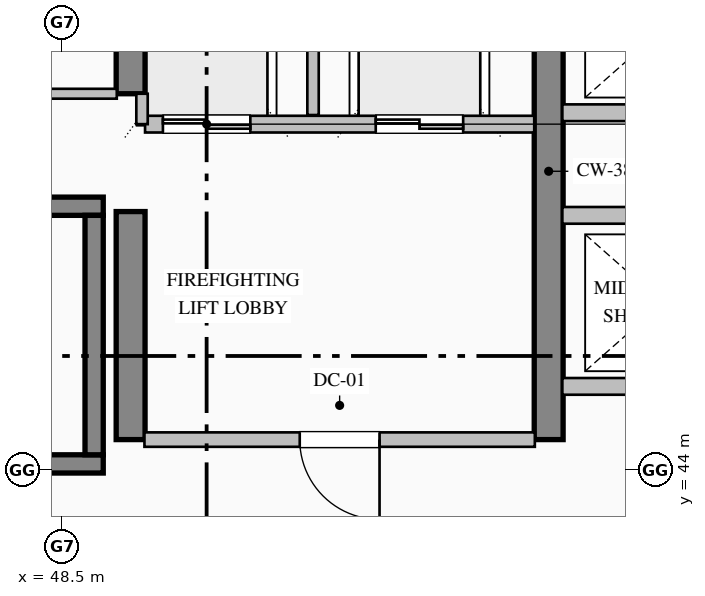
"""IFC4 building model, lengths in metres.
Left out: names, types, materials, properties, quantities, classifications, styles, units other than length and angle.
Written with IfcOpenShell. Run it as: python <this file> out.ifc"""

import sys

from ifc_helpers import new_model, si_unit, direction, frame, frame_2d, origin, place, context, subcontext, project, spatial, rectangle, extrude, element, fill, save


model = new_model("IFC4")
c1 = context("Model", 3, precision=1e-05, world=origin(), true_north=direction((0.0, 1.0)))
c2 = subcontext(c1, "Body", "Model", "MODEL_VIEW")
j1 = project(units=[si_unit("LENGTHUNIT", "METRE"), si_unit("PLANEANGLEUNIT", "RADIAN")], contexts=[c1])
p1 = place(None, origin())
s1 = spatial("IfcSite", under=j1, at=p1, CompositionType="ELEMENT")
p2 = place(p1, origin())
s2 = spatial("IfcBuilding", under=s1, at=p2, CompositionType="ELEMENT")
p3 = place(p2, frame((0.0, 0.0, 52.2)))
s3 = spatial("IfcBuildingStorey", under=s2, at=p3, CompositionType="ELEMENT", Elevation=52.2)
p4 = place(p3, frame((49.4, 44.4, 0.0), z_axis=(0.0, 0.0, 1.0), x_axis=(0.0, 1.0, 0.0)))
e1 = element("IfcWall", 1, at=p4, inside=s3, PredefinedType="SHEAR", context=c2, shape_type="SweptSolid", body=[
    extrude(rectangle(XDim=3.0, YDim=0.38, at=frame_2d((1.5, 0.0))), origin(), (0.0, 0.0, 1.0), 3.75),
])
p5 = place(p3, frame((49.4, 48.95, 0.0), z_axis=(0.0, 0.0, 1.0), x_axis=(0.0, 1.0, 0.0)))
e2 = element("IfcWall", 2, at=p5, inside=s3, PredefinedType="SHEAR", context=c2, shape_type="SweptSolid", body=[
    extrude(rectangle(XDim=2.51, YDim=0.38, at=frame_2d((1.255, 0.0))), origin(), (0.0, 0.0, 1.0), 3.75),
])
p6 = place(p3, frame((54.9, 44.4, 0.0), z_axis=(0.0, 0.0, 1.0), x_axis=(0.0, 1.0, 0.0)))
e3 = element("IfcWall", 3, at=p6, inside=s3, PredefinedType="SHEAR", context=c2, shape_type="SweptSolid", body=[
    extrude(rectangle(XDim=7.06, YDim=0.38, at=frame_2d((3.53, 0.0))), origin(), (0.0, 0.0, 1.0), 3.75),
])
for number, where, z_axis, x_axis in (
    (4, (40.96, 47.47, 0.0), (0.0, 0.0, 1.0), (1.0, 0.0, 0.0)),
    (5, (49.04, 44.08, 0.0), (0.0, 0.0, 1.0), (-1.0, 0.0, 0.0)),
):
    element("IfcWall", number, at=place(p3, frame(where, z_axis=z_axis, x_axis=x_axis)), inside=s3, PredefinedType="SOLIDWALL", context=c2, shape_type="SweptSolid", body=[
        extrude(rectangle(XDim=8.08, YDim=0.24, at=frame_2d((4.04, 0.0))), origin(), (0.0, 0.0, 1.0), 4.0),
    ])
p7 = place(p3, frame((48.92, 44.2, 0.0), z_axis=(0.0, 0.0, 1.0), x_axis=(0.0, 1.0, 0.0)))
e6 = element("IfcWall", 6, at=p7, inside=s3, PredefinedType="SOLIDWALL", context=c2, shape_type="SweptSolid", body=[
    extrude(rectangle(XDim=3.15, YDim=0.24, at=frame_2d((1.575, 0.0))), origin(), (0.0, 0.0, 1.0), 4.0),
])
p8 = place(p3, frame((54.71, 48.55, 0.0), z_axis=(0.0, 0.0, 1.0), x_axis=(-1.0, 0.0, 0.0)))
e7 = element("IfcWall", 7, at=p8, inside=s3, PredefinedType="PARTITIONING", context=c2, shape_type="SweptSolid", body=[
    extrude(rectangle(XDim=5.12, YDim=0.22, at=frame_2d((2.56, 0.0))), origin(), (0.0, 0.0, 1.0), 3.75),
])
p9 = place(p8, frame((3.735, 0.0, 0.0)))
e8 = element("IfcOpeningElement", 8, at=p9, cuts=e7, PredefinedType="OPENING", context=c2, shape_type="SweptSolid", body=[
    extrude(rectangle(XDim=1.15, YDim=2.2, at=frame_2d((0.575, 1.1))), frame((0.0, 0.12, 0.0), z_axis=(0.0, -1.0, 0.0), x_axis=(1.0, 0.0, 0.0)), (0.0, 0.0, 1.0), 0.24),
])
p10 = place(p8, frame((0.935, 0.0, 0.0)))
e9 = element("IfcOpeningElement", 9, at=p10, cuts=e7, PredefinedType="OPENING", context=c2, shape_type="SweptSolid", body=[
    extrude(rectangle(XDim=1.15, YDim=2.2, at=frame_2d((0.575, 1.1))), frame((0.0, 0.12, 0.0), z_axis=(0.0, -1.0, 0.0), x_axis=(1.0, 0.0, 0.0)), (0.0, 0.0, 1.0), 0.24),
])
p11 = place(p3, frame((51.8, 48.67, 0.0), z_axis=(0.0, 0.0, 1.0), x_axis=(0.0, 1.0, 0.0)))
e10 = element("IfcWall", 10, at=p11, inside=s3, PredefinedType="PARTITIONING", context=c2, shape_type="SweptSolid", body=[
    extrude(rectangle(XDim=2.79, YDim=0.15, at=frame_2d((1.395, 0.0))), origin(), (0.0, 0.0, 1.0), 3.75),
])
p12 = place(p3, frame((49.55, 48.55, 0.0), z_axis=(0.0, 0.0, 1.0), x_axis=(0.0, 1.0, 0.0)))
e11 = element("IfcWall", 11, at=p12, inside=s3, PredefinedType="PARTITIONING", context=c2, shape_type="SweptSolid", body=[
    extrude(rectangle(XDim=0.4, YDim=0.15, at=frame_2d((0.2, 0.0))), origin(), (0.0, 0.0, 1.0), 3.75),
])
for number, where, z_axis, x_axis in (
    (12, (63.32, 45.1, 0.0), (0.0, 0.0, 1.0), (-1.0, 0.0, 0.0)),
    (13, (55.08, 47.35, 0.0), (0.0, 0.0, 1.0), (1.0, 0.0, 0.0)),
    (14, (63.32, 48.7, 0.0), (0.0, 0.0, 1.0), (-1.0, 0.0, 0.0)),
):
    element("IfcWall", number, at=place(p3, frame(where, z_axis=z_axis, x_axis=x_axis)), inside=s3, PredefinedType="PARTITIONING", context=c2, shape_type="SweptSolid", body=[
        extrude(rectangle(XDim=8.24, YDim=0.22, at=frame_2d((4.12, 0.0))), origin(), (0.0, 0.0, 1.0), 3.75),
    ])
p13 = place(p3, frame((45.2, 48.95, 0.0), z_axis=(0.0, 0.0, 1.0), x_axis=(1.0, 0.0, 0.0)))
e15 = element("IfcWall", 15, at=p13, inside=s3, PredefinedType="PARTITIONING", context=c2, shape_type="SweptSolid", body=[
    extrude(rectangle(XDim=4.018, YDim=0.13, at=frame_2d((2.009, 0.0))), origin(), (0.0, 0.0, 1.0), 3.75),
])
p14 = place(p13, frame((1.549, 0.0, 0.0)))
e16 = element("IfcOpeningElement", 16, at=p14, cuts=e15, PredefinedType="OPENING", context=c2, shape_type="SweptSolid", body=[
    extrude(rectangle(XDim=0.92, YDim=2.15, at=frame_2d((0.46, 1.075))), frame((0.0, 0.075, 0.0), z_axis=(0.0, -1.0, 0.0), x_axis=(1.0, 0.0, 0.0)), (0.0, 0.0, 1.0), 0.15),
])
p15 = place(p3, frame((54.718, 44.4, 0.0), z_axis=(0.0, 0.0, 1.0), x_axis=(-1.0, 0.0, 0.0)))
e17 = element("IfcWall", 17, at=p15, inside=s3, PredefinedType="PARTITIONING", context=c2, shape_type="SweptSolid", body=[
    extrude(rectangle(XDim=5.136, YDim=0.19, at=frame_2d((2.568, 0.0))), origin(), (0.0, 0.0, 1.0), 3.75),
])
p16 = place(p15, frame((2.043, 0.0, 0.0)))
e18 = element("IfcOpeningElement", 18, at=p16, cuts=e17, PredefinedType="OPENING", context=c2, shape_type="SweptSolid", body=[
    extrude(rectangle(XDim=1.05, YDim=2.15, at=frame_2d((0.525, 1.075))), frame((0.0, 0.105, 0.0), z_axis=(0.0, -1.0, 0.0), x_axis=(1.0, 0.0, 0.0)), (0.0, 0.0, 1.0), 0.21),
])
p17 = place(p9, origin())
e19 = element("IfcDoor", 19, at=p17, inside=s3, OperationType="DOUBLE_DOOR_SLIDING", PredefinedType="DOOR", context=c2, shape_type="SweptSolid", body=[
    extrude(rectangle(XDim=1.15, YDim=2.2, at=frame_2d((0.575, 1.1))), frame((0.0, 0.025, 0.0), z_axis=(0.0, -1.0, 0.0), x_axis=(1.0, 0.0, 0.0)), (0.0, 0.0, 1.0), 0.05),
])
fill(e8, e19)
p18 = place(p10, origin())
e20 = element("IfcDoor", 20, at=p18, inside=s3, OperationType="DOUBLE_DOOR_SLIDING", PredefinedType="DOOR", context=c2, shape_type="SweptSolid", body=[
    extrude(rectangle(XDim=1.15, YDim=2.2, at=frame_2d((0.575, 1.1))), frame((0.0, 0.025, 0.0), z_axis=(0.0, -1.0, 0.0), x_axis=(1.0, 0.0, 0.0)), (0.0, 0.0, 1.0), 0.05),
])
fill(e9, e20)
p19 = place(p16, origin())
e21 = element("IfcDoor", 21, at=p19, inside=s3, OperationType="SINGLE_SWING_LEFT", PredefinedType="DOOR", context=c2, shape_type="SweptSolid", body=[
    extrude(rectangle(XDim=1.05, YDim=2.15, at=frame_2d((0.525, 1.075))), frame((0.0, 0.025, 0.0), z_axis=(0.0, -1.0, 0.0), x_axis=(1.0, 0.0, 0.0)), (0.0, 0.0, 1.0), 0.05),
])
fill(e18, e21)
save(model, sys.argv[1])
